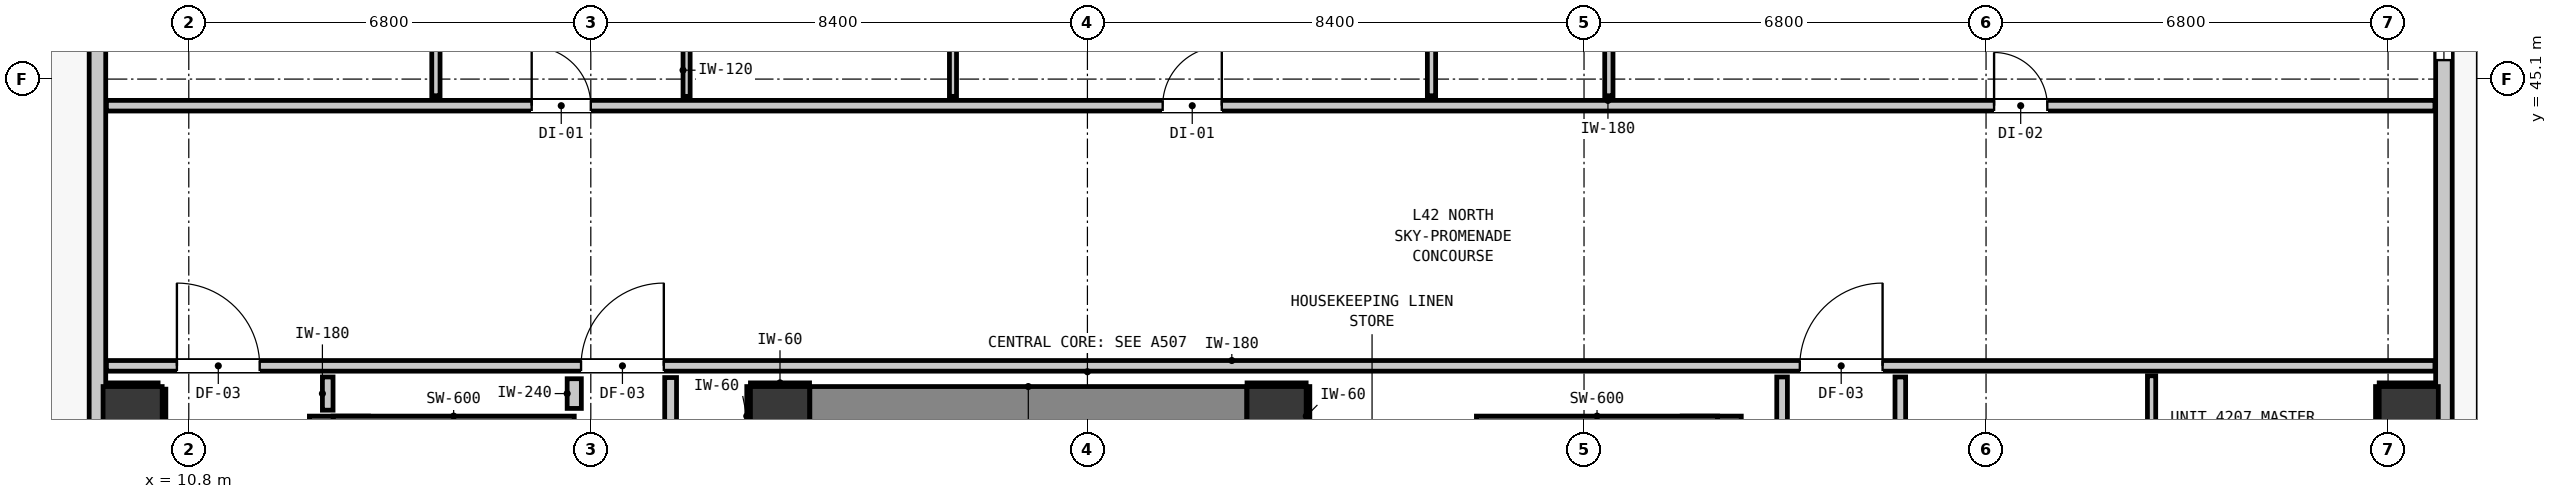
"""IFC4 building model, lengths in metres.
Left out: names, types, materials, properties, quantities, classifications, styles, units other than length and angle.
Written with IfcOpenShell. Run it as: python <this file> out.ifc"""

import sys

from ifc_helpers import new_model, si_unit, direction, frame, frame_2d, origin, origin_2d, place, context, subcontext, project, spatial, rectangle, extrude, element, fill, save


model = new_model("IFC4")
c1 = context("Model", 3, precision=1e-05, world=origin(), true_north=direction((0.0, 1.0)))
c2 = subcontext(c1, "Body", "Model", "MODEL_VIEW")
j1 = project(units=[si_unit("LENGTHUNIT", "METRE"), si_unit("PLANEANGLEUNIT", "RADIAN")], contexts=[c1])
p1 = place(None, origin())
s1 = spatial("IfcSite", under=j1, at=p1, CompositionType="ELEMENT")
p2 = place(p1, origin())
s2 = spatial("IfcBuilding", under=s1, at=p2, CompositionType="ELEMENT")
p3 = place(p2, frame((0.0, 0.0, 145.92)))
s3 = spatial("IfcBuildingStorey", under=s2, at=p3, CompositionType="ELEMENT", Elevation=145.92)
for number, where, z_axis, x_axis in (
    (1, (20.8, 39.4, 0.0), (0.0, 0.0, 1.0), (1.0, 0.0, 0.0)),
    (2, (29.2, 39.4, 0.0), (0.0, 0.0, 1.0), (1.0, 0.0, 0.0)),
):
    element("IfcColumn", number, at=place(p3, frame(where, z_axis=z_axis, x_axis=x_axis)), inside=s3, PredefinedType="COLUMN", context=c2, shape_type="SweptSolid", body=[
        extrude(rectangle(XDim=1.0, YDim=1.0, at=origin_2d()), origin(), (0.0, 0.0, 1.0), 3.32),
    ])
p4 = place(p3, frame((13.34, 31.205, 0.0), z_axis=(0.0, 0.0, 1.0), x_axis=(0.0, 1.0, 0.0)))
e3 = element("IfcWall", 3, at=p4, inside=s3, PredefinedType="SHEAR", context=c2, shape_type="SweptSolid", body=[
    extrude(rectangle(XDim=8.195, YDim=1.0, at=frame_2d((4.097, 0.0))), origin(), (0.0, 0.0, 1.0), 3.32),
])
p5 = place(p3, frame((13.24, 39.1, 0.0), z_axis=(0.0, 0.0, 1.0), x_axis=(1.0, 0.0, 0.0)))
e4 = element("IfcWall", 4, at=p5, inside=s3, PredefinedType="SHEAR", context=c2, shape_type="SweptSolid", body=[
    extrude(rectangle(XDim=4.08, YDim=0.6, at=frame_2d((2.04, 0.0))), origin(), (0.0, 0.0, 1.0), 3.32),
])
p6 = place(p3, frame((36.56, 31.205, 0.0), z_axis=(0.0, 0.0, 1.0), x_axis=(0.0, 1.0, 0.0)))
e5 = element("IfcWall", 5, at=p6, inside=s3, PredefinedType="SHEAR", context=c2, shape_type="SweptSolid", body=[
    extrude(rectangle(XDim=8.195, YDim=1.0, at=frame_2d((4.097, 0.0))), origin(), (0.0, 0.0, 1.0), 3.32),
])
p7 = place(p3, frame((32.58, 39.1, 0.0), z_axis=(0.0, 0.0, 1.0), x_axis=(1.0, 0.0, 0.0)))
e6 = element("IfcWall", 6, at=p7, inside=s3, PredefinedType="SHEAR", context=c2, shape_type="SweptSolid", body=[
    extrude(rectangle(XDim=4.08, YDim=0.6, at=frame_2d((2.04, 0.0))), origin(), (0.0, 0.0, 1.0), 3.32),
])
p8 = place(p3, frame((21.305, 39.4, 0.0), z_axis=(0.0, 0.0, 1.0), x_axis=(1.0, 0.0, 0.0)))
e7 = element("IfcWall", 7, at=p8, inside=s3, PredefinedType="SHEAR", context=c2, shape_type="SweptSolid", body=[
    extrude(rectangle(XDim=7.39, YDim=1.0, at=frame_2d((3.695, 0.0))), origin(), (0.0, 0.0, 1.0), 3.32),
])
for number, where, z_axis, x_axis in (
    (8, (9.85, 39.4, -0.2), (0.0, 0.0, 1.0), (1.0, 0.0, 0.0)),
    (9, (48.35, 39.4, -0.2), (0.0, 0.0, 1.0), (1.0, 0.0, 0.0)),
):
    element("IfcColumn", number, at=place(p3, frame(where, z_axis=z_axis, x_axis=x_axis)), inside=s3, PredefinedType="COLUMN", context=c2, shape_type="SweptSolid", body=[
        extrude(rectangle(XDim=1.0, YDim=1.0, at=origin_2d()), origin(), (0.0, 0.0, 1.0), 3.52),
    ])
p9 = place(p3, frame((9.255, 17.555, 0.0), z_axis=(0.0, 0.0, 1.0), x_axis=(0.0, 1.0, 0.0)))
e10 = element("IfcWall", 10, at=p9, inside=s3, PredefinedType="STANDARD", context=c2, shape_type="SweptSolid", body=[
    extrude(rectangle(XDim=32.29, YDim=0.28, at=frame_2d((16.145, 0.0))), origin(), (0.0, 0.0, 1.0), 3.08),
])
p10 = place(p9, frame((5.467, 0.0, 0.0)))
e11 = element("IfcOpeningElement", 11, at=p10, cuts=e10, PredefinedType="OPENING", context=c2, shape_type="SweptSolid", body=[
    extrude(rectangle(XDim=1.0, YDim=2.15, at=frame_2d((0.5, 1.075))), frame((0.0, 0.15, 0.0), z_axis=(0.0, -1.0, 0.0), x_axis=(1.0, 0.0, 0.0)), (0.0, 0.0, 1.0), 0.3),
])
p11 = place(p9, frame((30.753, 0.0, 0.85)))
e12 = element("IfcOpeningElement", 12, at=p11, cuts=e10, PredefinedType="OPENING", context=c2, shape_type="SweptSolid", body=[
    extrude(rectangle(XDim=1.05, YDim=1.65, at=frame_2d((0.525, 0.825))), frame((0.0, 0.15, 0.0), z_axis=(0.0, -1.0, 0.0), x_axis=(1.0, 0.0, 0.0)), (0.0, 0.0, 1.0), 0.3),
])
p12 = place(p3, frame((48.945, 49.845, 0.0), z_axis=(0.0, 0.0, 1.0), x_axis=(0.0, -1.0, 0.0)))
e13 = element("IfcWall", 13, at=p12, inside=s3, PredefinedType="STANDARD", context=c2, shape_type="SweptSolid", body=[
    extrude(rectangle(XDim=32.29, YDim=0.28, at=frame_2d((16.145, 0.0))), origin(), (0.0, 0.0, 1.0), 3.08),
])
p13 = place(p12, frame((0.904, 0.0, 0.0)))
e14 = element("IfcOpeningElement", 14, at=p13, cuts=e13, PredefinedType="OPENING", context=c2, shape_type="SweptSolid", body=[
    extrude(rectangle(XDim=1.0, YDim=2.15, at=frame_2d((0.5, 1.075))), frame((0.0, 0.15, 0.0), z_axis=(0.0, -1.0, 0.0), x_axis=(1.0, 0.0, 0.0)), (0.0, 0.0, 1.0), 0.3),
])
p14 = place(p12, frame((2.774, 0.0, 0.85)))
e15 = element("IfcOpeningElement", 15, at=p14, cuts=e13, PredefinedType="OPENING", context=c2, shape_type="SweptSolid", body=[
    extrude(rectangle(XDim=1.65, YDim=1.75, at=frame_2d((0.825, 0.875))), frame((0.0, 0.15, 0.0), z_axis=(0.0, -1.0, 0.0), x_axis=(1.0, 0.0, 0.0)), (0.0, 0.0, 1.0), 0.3),
])
p15 = place(p12, frame((23.582, 0.0, 0.85)))
e16 = element("IfcOpeningElement", 16, at=p15, cuts=e13, PredefinedType="OPENING", context=c2, shape_type="SweptSolid", body=[
    extrude(rectangle(XDim=1.65, YDim=1.75, at=frame_2d((0.825, 0.875))), frame((0.0, 0.15, 0.0), z_axis=(0.0, -1.0, 0.0), x_axis=(1.0, 0.0, 0.0)), (0.0, 0.0, 1.0), 0.3),
])
p16 = place(p12, frame((20.433, 0.0, 0.85)))
e17 = element("IfcOpeningElement", 17, at=p16, cuts=e13, PredefinedType="OPENING", context=c2, shape_type="SweptSolid", body=[
    extrude(rectangle(XDim=1.65, YDim=1.75, at=frame_2d((0.825, 0.875))), frame((0.0, 0.15, 0.0), z_axis=(0.0, -1.0, 0.0), x_axis=(1.0, 0.0, 0.0)), (0.0, 0.0, 1.0), 0.3),
])
p17 = place(p12, frame((14.048, 0.0, 0.85)))
e18 = element("IfcOpeningElement", 18, at=p17, cuts=e13, PredefinedType="OPENING", context=c2, shape_type="SweptSolid", body=[
    extrude(rectangle(XDim=1.65, YDim=1.75, at=frame_2d((0.825, 0.875))), frame((0.0, 0.15, 0.0), z_axis=(0.0, -1.0, 0.0), x_axis=(1.0, 0.0, 0.0)), (0.0, 0.0, 1.0), 0.3),
])
p18 = place(p12, frame((11.247, 0.0, 0.85)))
e19 = element("IfcOpeningElement", 19, at=p18, cuts=e13, PredefinedType="OPENING", context=c2, shape_type="SweptSolid", body=[
    extrude(rectangle(XDim=1.05, YDim=1.65, at=frame_2d((0.525, 0.825))), frame((0.0, 0.15, 0.0), z_axis=(0.0, -1.0, 0.0), x_axis=(1.0, 0.0, 0.0)), (0.0, 0.0, 1.0), 0.3),
])
p19 = place(p3, frame((9.407, 40.25, 0.0), z_axis=(0.0, 0.0, 1.0), x_axis=(1.0, 0.0, 0.0)))
e20 = element("IfcWall", 20, at=p19, inside=s3, PredefinedType="PARTITIONING", context=c2, shape_type="SweptSolid", body=[
    extrude(rectangle(XDim=39.386, YDim=0.18, at=frame_2d((19.693, 0.0))), origin(), (0.0, 0.0, 1.0), 3.08),
])
p20 = place(p19, frame((8.028, 0.0, 0.0)))
e21 = element("IfcOpeningElement", 21, at=p20, cuts=e20, PredefinedType="OPENING", context=c2, shape_type="SweptSolid", body=[
    extrude(rectangle(XDim=1.4, YDim=2.15, at=frame_2d((0.7, 1.075))), frame((0.0, 0.1, 0.0), z_axis=(0.0, -1.0, 0.0), x_axis=(1.0, 0.0, 0.0)), (0.0, 0.0, 1.0), 0.2),
])
p21 = place(p19, frame((1.192, 0.0, 0.0)))
e22 = element("IfcOpeningElement", 22, at=p21, cuts=e20, PredefinedType="OPENING", context=c2, shape_type="SweptSolid", body=[
    extrude(rectangle(XDim=1.4, YDim=2.15, at=frame_2d((0.7, 1.075))), frame((0.0, 0.1, 0.0), z_axis=(0.0, -1.0, 0.0), x_axis=(1.0, 0.0, 0.0)), (0.0, 0.0, 1.0), 0.2),
])
p22 = place(p19, frame((28.643, 0.0, 0.0)))
e23 = element("IfcOpeningElement", 23, at=p22, cuts=e20, PredefinedType="OPENING", context=c2, shape_type="SweptSolid", body=[
    extrude(rectangle(XDim=1.4, YDim=2.15, at=frame_2d((0.7, 1.075))), frame((0.0, 0.1, 0.0), z_axis=(0.0, -1.0, 0.0), x_axis=(1.0, 0.0, 0.0)), (0.0, 0.0, 1.0), 0.2),
])
p23 = place(p3, frame((9.407, 44.65, 0.0), z_axis=(0.0, 0.0, 1.0), x_axis=(1.0, 0.0, 0.0)))
e24 = element("IfcWall", 24, at=p23, inside=s3, PredefinedType="PARTITIONING", context=c2, shape_type="SweptSolid", body=[
    extrude(rectangle(XDim=39.386, YDim=0.18, at=frame_2d((19.693, 0.0))), origin(), (0.0, 0.0, 1.0), 3.08),
])
p24 = place(p23, frame((7.193, 0.0, 0.0)))
e25 = element("IfcOpeningElement", 25, at=p24, cuts=e24, PredefinedType="OPENING", context=c2, shape_type="SweptSolid", body=[
    extrude(rectangle(XDim=1.0, YDim=2.15, at=frame_2d((0.5, 1.075))), frame((0.0, 0.1, 0.0), z_axis=(0.0, -1.0, 0.0), x_axis=(1.0, 0.0, 0.0)), (0.0, 0.0, 1.0), 0.2),
])
p25 = place(p23, frame((17.866, 0.0, 0.0)))
e26 = element("IfcOpeningElement", 26, at=p25, cuts=e24, PredefinedType="OPENING", context=c2, shape_type="SweptSolid", body=[
    extrude(rectangle(XDim=1.0, YDim=2.15, at=frame_2d((0.5, 1.075))), frame((0.0, 0.1, 0.0), z_axis=(0.0, -1.0, 0.0), x_axis=(1.0, 0.0, 0.0)), (0.0, 0.0, 1.0), 0.2),
])
p26 = place(p23, frame((31.929, 0.0, 0.0)))
e27 = element("IfcOpeningElement", 27, at=p26, cuts=e24, PredefinedType="OPENING", context=c2, shape_type="SweptSolid", body=[
    extrude(rectangle(XDim=0.9, YDim=2.1, at=frame_2d((0.45, 1.05))), frame((0.0, 0.1, 0.0), z_axis=(0.0, -1.0, 0.0), x_axis=(1.0, 0.0, 0.0)), (0.0, 0.0, 1.0), 0.2),
])
p27 = place(p3, frame((17.32, 39.53, 0.0), z_axis=(0.0, 0.0, 1.0), x_axis=(0.0, 1.0, 0.0)))
e28 = element("IfcWall", 28, at=p27, inside=s3, PredefinedType="PARTITIONING", context=c2, shape_type="SweptSolid", body=[
    extrude(rectangle(XDim=0.502, YDim=0.24, at=frame_2d((0.251, 0.0))), origin(), (0.0, 0.0, 1.0), 3.08),
])
p28 = place(p3, frame((18.95, 38.918, 0.0), z_axis=(0.0, 0.0, 1.0), x_axis=(0.0, 1.0, 0.0)))
e29 = element("IfcWall", 29, at=p28, inside=s3, PredefinedType="PARTITIONING", context=c2, shape_type="SweptSolid", body=[
    extrude(rectangle(XDim=1.134, YDim=0.2, at=frame_2d((0.567, 0.0))), origin(), (0.0, 0.0, 1.0), 3.08),
])
p29 = place(p3, frame((13.15, 39.5, 0.0), z_axis=(0.0, 0.0, 1.0), x_axis=(0.0, 1.0, 0.0)))
e30 = element("IfcWall", 30, at=p29, inside=s3, PredefinedType="PARTITIONING", context=c2, shape_type="SweptSolid", body=[
    extrude(rectangle(XDim=0.562, YDim=0.18, at=frame_2d((0.281, 0.0))), origin(), (0.0, 0.0, 1.0), 2.315),
])
p30 = place(p3, frame((37.75, 21.368, 0.0), z_axis=(0.0, 0.0, 1.0), x_axis=(0.0, 1.0, 0.0)))
e31 = element("IfcWall", 31, at=p30, inside=s3, PredefinedType="PARTITIONING", context=c2, shape_type="SweptSolid", body=[
    extrude(rectangle(XDim=18.694, YDim=0.18, at=frame_2d((9.347, 0.0))), origin(), (0.0, 0.0, 1.0), 3.08),
])
p31 = place(p3, frame((39.75, 37.313, 0.0), z_axis=(0.0, 0.0, 1.0), x_axis=(0.0, 1.0, 0.0)))
e32 = element("IfcWall", 32, at=p31, inside=s3, PredefinedType="PARTITIONING", context=c2, shape_type="SweptSolid", body=[
    extrude(rectangle(XDim=2.749, YDim=0.18, at=frame_2d((1.375, 0.0))), origin(), (0.0, 0.0, 1.0), 3.08),
])
p32 = place(p3, frame((14.98, 44.818, 0.0), z_axis=(0.0, 0.0, 1.0), x_axis=(0.0, 1.0, 0.0)))
e33 = element("IfcWall", 33, at=p32, inside=s3, PredefinedType="PARTITIONING", context=c2, shape_type="SweptSolid", body=[
    extrude(rectangle(XDim=2.844, YDim=0.14, at=frame_2d((1.422, 0.0))), origin(), (0.0, 0.0, 1.0), 3.08),
])
p33 = place(p32, frame((0.995, 0.0, 0.0)))
e34 = element("IfcOpeningElement", 34, at=p33, cuts=e33, PredefinedType="OPENING", context=c2, shape_type="SweptSolid", body=[
    extrude(rectangle(XDim=0.86, YDim=2.02, at=frame_2d((0.43, 1.01))), frame((0.0, 0.08, 0.0), z_axis=(0.0, -1.0, 0.0), x_axis=(1.0, 0.0, 0.0)), (0.0, 0.0, 1.0), 0.16),
])
p34 = place(p3, frame((31.82, 44.818, 0.0), z_axis=(0.0, 0.0, 1.0), x_axis=(0.0, 1.0, 0.0)))
e35 = element("IfcWall", 35, at=p34, inside=s3, PredefinedType="PARTITIONING", context=c2, shape_type="SweptSolid", body=[
    extrude(rectangle(XDim=2.844, YDim=0.14, at=frame_2d((1.422, 0.0))), origin(), (0.0, 0.0, 1.0), 3.08),
])
p35 = place(p34, frame((0.975, 0.0, 0.0)))
e36 = element("IfcOpeningElement", 36, at=p35, cuts=e35, PredefinedType="OPENING", context=c2, shape_type="SweptSolid", body=[
    extrude(rectangle(XDim=0.9, YDim=2.1, at=frame_2d((0.45, 1.05))), frame((0.0, 0.08, 0.0), z_axis=(0.0, -1.0, 0.0), x_axis=(1.0, 0.0, 0.0)), (0.0, 0.0, 1.0), 0.16),
])
p36 = place(p3, frame((34.82, 44.818, 0.0), z_axis=(0.0, 0.0, 1.0), x_axis=(0.0, 1.0, 0.0)))
e37 = element("IfcWall", 37, at=p36, inside=s3, PredefinedType="PARTITIONING", context=c2, shape_type="SweptSolid", body=[
    extrude(rectangle(XDim=2.844, YDim=0.14, at=frame_2d((1.422, 0.0))), origin(), (0.0, 0.0, 1.0), 3.08),
])
p37 = place(p3, frame((44.0, 37.293, 0.0), z_axis=(0.0, 0.0, 1.0), x_axis=(0.0, 1.0, 0.0)))
e38 = element("IfcWall", 38, at=p37, inside=s3, PredefinedType="PARTITIONING", context=c2, shape_type="SweptSolid", body=[
    extrude(rectangle(XDim=2.789, YDim=0.14, at=frame_2d((1.395, 0.0))), origin(), (0.0, 0.0, 1.0), 3.08),
])
p38 = place(p3, frame((19.22, 44.808, 0.0), z_axis=(0.0, 0.0, 1.0), x_axis=(0.0, 1.0, 0.0)))
e39 = element("IfcWall", 39, at=p38, inside=s3, PredefinedType="PARTITIONING", context=c2, shape_type="SweptSolid", body=[
    extrude(rectangle(XDim=2.864, YDim=0.12, at=frame_2d((1.432, 0.0))), origin(), (0.0, 0.0, 1.0), 3.08),
])
p39 = place(p38, frame((0.985, 0.0, 0.0)))
e40 = element("IfcOpeningElement", 40, at=p39, cuts=e39, PredefinedType="OPENING", context=c2, shape_type="SweptSolid", body=[
    extrude(rectangle(XDim=0.9, YDim=2.1, at=frame_2d((0.45, 1.05))), frame((0.0, 0.07, 0.0), z_axis=(0.0, -1.0, 0.0), x_axis=(1.0, 0.0, 0.0)), (0.0, 0.0, 1.0), 0.14),
])
p40 = place(p3, frame((23.726, 44.808, 0.0), z_axis=(0.0, 0.0, 1.0), x_axis=(0.0, 1.0, 0.0)))
e41 = element("IfcWall", 41, at=p40, inside=s3, PredefinedType="PARTITIONING", context=c2, shape_type="SweptSolid", body=[
    extrude(rectangle(XDim=2.864, YDim=0.12, at=frame_2d((1.432, 0.0))), origin(), (0.0, 0.0, 1.0), 3.08),
])
for number, where, z_axis, x_axis in (
    (42, (20.3, 39.932, 0.0), (0.0, 0.0, 1.0), (1.0, 0.0, 0.0)),
    (43, (20.268, 38.9, 0.0), (0.0, 0.0, 1.0), (0.0, 1.0, 0.0)),
    (44, (28.7, 39.932, 0.0), (0.0, 0.0, 1.0), (1.0, 0.0, 0.0)),
    (45, (29.732, 38.9, 0.0), (0.0, 0.0, 1.0), (0.0, 1.0, 0.0)),
):
    element("IfcWall", number, at=place(p3, frame(where, z_axis=z_axis, x_axis=x_axis)), inside=s3, PredefinedType="PARTITIONING", context=c2, shape_type="SweptSolid", body=[
        extrude(rectangle(XDim=1.0, YDim=0.06, at=frame_2d((0.5, 0.0))), origin(), (0.0, 0.0, 1.0), 1.45),
    ])
p41 = place(p3, frame((9.41, 39.932, 0.0), z_axis=(0.0, 0.0, 1.0), x_axis=(1.0, 0.0, 0.0)))
e46 = element("IfcWall", 46, at=p41, inside=s3, PredefinedType="PARTITIONING", context=c2, shape_type="SweptSolid", body=[
    extrude(rectangle(XDim=0.871, YDim=0.06, at=frame_2d((0.436, 0.0))), origin(), (0.0, 0.0, 1.0), 1.45),
])
p42 = place(p3, frame((10.382, 38.9, 0.0), z_axis=(0.0, 0.0, 1.0), x_axis=(0.0, 1.0, 0.0)))
e47 = element("IfcWall", 47, at=p42, inside=s3, PredefinedType="PARTITIONING", context=c2, shape_type="SweptSolid", body=[
    extrude(rectangle(XDim=0.956, YDim=0.06, at=frame_2d((0.478, 0.0))), origin(), (0.0, 0.0, 1.0), 1.45),
])
p43 = place(p3, frame((47.85, 39.932, 0.0), z_axis=(0.0, 0.0, 1.0), x_axis=(1.0, 0.0, 0.0)))
e48 = element("IfcWall", 48, at=p43, inside=s3, PredefinedType="PARTITIONING", context=c2, shape_type="SweptSolid", body=[
    extrude(rectangle(XDim=0.94, YDim=0.06, at=frame_2d((0.47, 0.0))), origin(), (0.0, 0.0, 1.0), 1.45),
])
p44 = place(p3, frame((47.818, 38.9, 0.0), z_axis=(0.0, 0.0, 1.0), x_axis=(0.0, 1.0, 0.0)))
e49 = element("IfcWall", 49, at=p44, inside=s3, PredefinedType="PARTITIONING", context=c2, shape_type="SweptSolid", body=[
    extrude(rectangle(XDim=1.0, YDim=0.06, at=frame_2d((0.5, 0.0))), origin(), (0.0, 0.0, 1.0), 1.45),
])
p45 = place(p14, origin())
e50 = element("IfcWindow", 50, at=p45, inside=s3, PartitioningType="SINGLE_PANEL", PredefinedType="WINDOW", context=c2, shape_type="SweptSolid", body=[
    extrude(rectangle(XDim=1.65, YDim=1.75, at=frame_2d((0.825, 0.875))), frame((0.0, 0.03, 0.0), z_axis=(0.0, -1.0, 0.0), x_axis=(1.0, 0.0, 0.0)), (0.0, 0.0, 1.0), 0.06),
])
fill(e15, e50)
p46 = place(p20, origin())
e51 = element("IfcDoor", 51, at=p46, inside=s3, OperationType="SINGLE_SWING_RIGHT", PredefinedType="DOOR", context=c2, shape_type="SweptSolid", body=[
    extrude(rectangle(XDim=1.4, YDim=2.15, at=frame_2d((0.7, 1.075))), frame((0.0, 0.025, 0.0), z_axis=(0.0, -1.0, 0.0), x_axis=(1.0, 0.0, 0.0)), (0.0, 0.0, 1.0), 0.05),
])
fill(e21, e51)
p47 = place(p21, origin())
e52 = element("IfcDoor", 52, at=p47, inside=s3, OperationType="SINGLE_SWING_LEFT", PredefinedType="DOOR", context=c2, shape_type="SweptSolid", body=[
    extrude(rectangle(XDim=1.4, YDim=2.15, at=frame_2d((0.7, 1.075))), frame((0.0, 0.025, 0.0), z_axis=(0.0, -1.0, 0.0), x_axis=(1.0, 0.0, 0.0)), (0.0, 0.0, 1.0), 0.05),
])
fill(e22, e52)
p48 = place(p22, origin())
e53 = element("IfcDoor", 53, at=p48, inside=s3, OperationType="SINGLE_SWING_RIGHT", PredefinedType="DOOR", context=c2, shape_type="SweptSolid", body=[
    extrude(rectangle(XDim=1.4, YDim=2.15, at=frame_2d((0.7, 1.075))), frame((0.0, 0.025, 0.0), z_axis=(0.0, -1.0, 0.0), x_axis=(1.0, 0.0, 0.0)), (0.0, 0.0, 1.0), 0.05),
])
fill(e23, e53)
p49 = place(p24, origin())
e54 = element("IfcDoor", 54, at=p49, inside=s3, OperationType="SINGLE_SWING_LEFT", PredefinedType="DOOR", context=c2, shape_type="SweptSolid", body=[
    extrude(rectangle(XDim=1.0, YDim=2.15, at=frame_2d((0.5, 1.075))), frame((0.0, 0.025, 0.0), z_axis=(0.0, -1.0, 0.0), x_axis=(1.0, 0.0, 0.0)), (0.0, 0.0, 1.0), 0.05),
])
fill(e25, e54)
p50 = place(p25, origin())
e55 = element("IfcDoor", 55, at=p50, inside=s3, OperationType="SINGLE_SWING_RIGHT", PredefinedType="DOOR", context=c2, shape_type="SweptSolid", body=[
    extrude(rectangle(XDim=1.0, YDim=2.15, at=frame_2d((0.5, 1.075))), frame((0.0, 0.025, 0.0), z_axis=(0.0, -1.0, 0.0), x_axis=(1.0, 0.0, 0.0)), (0.0, 0.0, 1.0), 0.05),
])
fill(e26, e55)
p51 = place(p26, origin())
e56 = element("IfcDoor", 56, at=p51, inside=s3, OperationType="SINGLE_SWING_LEFT", PredefinedType="DOOR", context=c2, shape_type="SweptSolid", body=[
    extrude(rectangle(XDim=0.9, YDim=2.1, at=frame_2d((0.45, 1.05))), frame((0.0, 0.025, 0.0), z_axis=(0.0, -1.0, 0.0), x_axis=(1.0, 0.0, 0.0)), (0.0, 0.0, 1.0), 0.05),
])
fill(e27, e56)
save(model, sys.argv[1])
